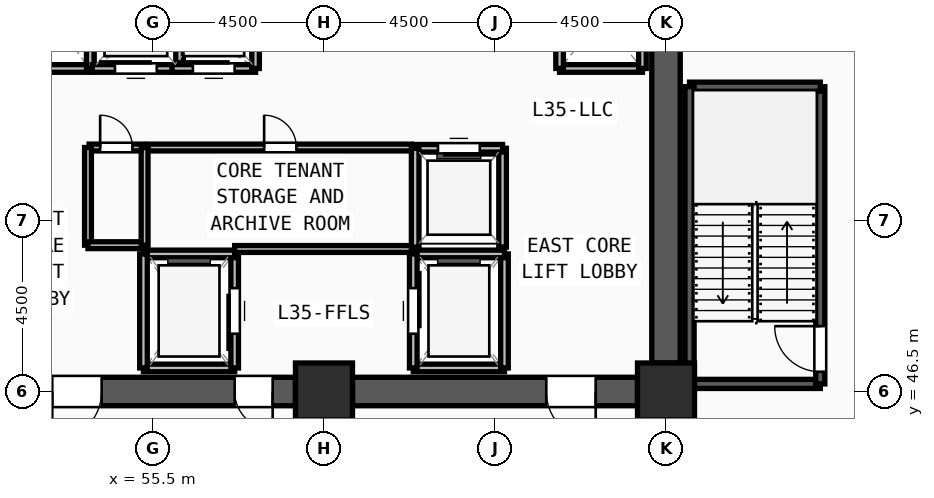
"""IFC4 building model, lengths in metres.
Left out: names, types, materials, properties, quantities, classifications, styles, units other than length and angle.
Written with IfcOpenShell. Run it as: python <this file> out.ifc"""

import sys

from ifc_helpers import new_model, si_unit, direction, frame, frame_2d, origin, origin_2d, place, context, subcontext, project, spatial, rectangle, extrude, source, transform, mapped, element, fill, save


model = new_model("IFC4")
c1 = context("Model", 3, precision=1e-05, world=origin(), true_north=direction((0.0, 1.0)))
c2 = subcontext(c1, "Body", "Model", "MODEL_VIEW")
j1 = project(units=[si_unit("LENGTHUNIT", "METRE"), si_unit("PLANEANGLEUNIT", "RADIAN")], contexts=[c1])
p1 = place(None, origin())
s1 = spatial("IfcSite", under=j1, at=p1, CompositionType="ELEMENT")
p2 = place(p1, origin())
s2 = spatial("IfcBuilding", under=s1, at=p2, CompositionType="ELEMENT")
p3 = place(p2, frame((0.0, 0.0, 135.75)))
s3 = spatial("IfcBuildingStorey", under=s2, at=p3, CompositionType="ELEMENT", Elevation=135.75)
m1 = source(origin(), c2, "Body", "SweptSolid", [
    extrude(rectangle(XDim=1.5, YDim=1.5, at=origin_2d()), origin(), (0.0, 0.0, 1.0), 3.75),
])
for number, where, z_axis, x_axis in (
    (1, (60.0, 46.5, 0.0), (0.0, 0.0, 1.0), (1.0, 0.0, 0.0)),
    (2, (69.0, 46.5, 0.0), (0.0, 0.0, 1.0), (1.0, 0.0, 0.0)),
):
    element("IfcColumn", number, at=place(p3, frame(where, z_axis=z_axis, x_axis=x_axis)), inside=s3, PredefinedType="COLUMN", context=c2, shape_type="MappedRepresentation", body=[
        mapped(m1, transform((0.0, 0.0, 0.0), x_axis=(1.0, 0.0, 0.0), y_axis=(0.0, 1.0, 0.0), z_axis=(0.0, 0.0, 1.0), scale=1.0)),
    ])
p4 = place(p3, frame((69.0, 60.75, 0.0), z_axis=(0.0, 0.0, 1.0), x_axis=(0.0, -1.0, 0.0)))
e3 = element("IfcWall", 3, at=p4, inside=s3, PredefinedType="SHEAR", context=c2, shape_type="SweptSolid", body=[
    extrude(rectangle(XDim=13.5, YDim=0.75, at=frame_2d((6.75, 0.0))), origin(), (0.0, 0.0, 1.0), 3.47),
])
m2 = source(origin(), c2, "Body", "SweptSolid", [
    extrude(rectangle(XDim=1.2, YDim=2.2, at=frame_2d((0.6, 1.1))), frame((0.0, 0.385, 0.0), z_axis=(0.0, -1.0, 0.0), x_axis=(1.0, 0.0, 0.0)), (0.0, 0.0, 1.0), 0.77),
])
p5 = place(p4, frame((1.2, 0.0, 0.0)))
e4 = element("IfcOpeningElement", 4, at=p5, cuts=e3, PredefinedType="OPENING", context=c2, shape_type="MappedRepresentation", body=[
    mapped(m2, transform((0.0, 0.0, 0.0), x_axis=(1.0, 0.0, 0.0), y_axis=(0.0, 1.0, 0.0), z_axis=(0.0, 0.0, 1.0), scale=1.0)),
])
p6 = place(p3, frame((68.25, 46.5, 0.0), z_axis=(0.0, 0.0, 1.0), x_axis=(-1.0, 0.0, 0.0)))
e5 = element("IfcWall", 5, at=p6, inside=s3, PredefinedType="SHEAR", context=c2, shape_type="SweptSolid", body=[
    extrude(rectangle(XDim=7.5, YDim=0.75, at=frame_2d((3.75, 0.0))), origin(), (0.0, 0.0, 1.0), 3.47),
])
m3 = source(origin(), c2, "Body", "SweptSolid", [
    extrude(rectangle(XDim=1.3, YDim=2.2, at=frame_2d((0.65, 1.1))), frame((0.0, 0.385, 0.0), z_axis=(0.0, -1.0, 0.0), x_axis=(1.0, 0.0, 0.0)), (0.0, 0.0, 1.0), 0.77),
])
p7 = place(p6, frame((1.1, 0.0, 0.0)))
e6 = element("IfcOpeningElement", 6, at=p7, cuts=e5, PredefinedType="OPENING", context=c2, shape_type="MappedRepresentation", body=[
    mapped(m3, transform((0.0, 0.0, 0.0), x_axis=(1.0, 0.0, 0.0), y_axis=(0.0, 1.0, 0.0), z_axis=(0.0, 0.0, 1.0), scale=1.0)),
])
p8 = place(p3, frame((59.25, 46.5, 0.0), z_axis=(0.0, 0.0, 1.0), x_axis=(-1.0, 0.0, 0.0)))
e7 = element("IfcWall", 7, at=p8, inside=s3, PredefinedType="SHEAR", context=c2, shape_type="SweptSolid", body=[
    extrude(rectangle(XDim=7.5, YDim=0.75, at=frame_2d((3.75, 0.0))), origin(), (0.0, 0.0, 1.0), 3.47),
])
p9 = place(p8, frame((5.1, 0.0, 0.0)))
e8 = element("IfcOpeningElement", 8, at=p9, cuts=e7, PredefinedType="OPENING", context=c2, shape_type="MappedRepresentation", body=[
    mapped(m3, transform((0.0, 0.0, 0.0), x_axis=(1.0, 0.0, 0.0), y_axis=(0.0, 1.0, 0.0), z_axis=(0.0, 0.0, 1.0), scale=1.0)),
])
m4 = source(origin(), c2, "Body", "SweptSolid", [
    extrude(rectangle(XDim=1.0, YDim=2.2, at=frame_2d((0.5, 1.1))), frame((0.0, 0.385, 0.0), z_axis=(0.0, -1.0, 0.0), x_axis=(1.0, 0.0, 0.0)), (0.0, 0.0, 1.0), 0.77),
])
p10 = place(p8, frame((0.6, 0.0, 0.0)))
e9 = element("IfcOpeningElement", 9, at=p10, cuts=e7, PredefinedType="OPENING", context=c2, shape_type="MappedRepresentation", body=[
    mapped(m4, transform((0.0, 0.0, 0.0), x_axis=(1.0, 0.0, 0.0), y_axis=(0.0, 1.0, 0.0), z_axis=(0.0, 0.0, 1.0), scale=1.0)),
])
p11 = place(p3, frame((69.62, 46.7, 0.0), z_axis=(0.0, 0.0, 1.0), x_axis=(1.0, 0.0, 0.0)))
e10 = element("IfcWall", 10, at=p11, inside=s3, PredefinedType="SOLIDWALL", context=c2, shape_type="SweptSolid", body=[
    extrude(rectangle(XDim=3.44, YDim=0.24, at=frame_2d((1.72, 0.0))), origin(), (0.0, 0.0, 1.0), 3.47),
])
p12 = place(p3, frame((73.06, 46.7, 0.0), z_axis=(0.0, 0.0, 1.0), x_axis=(0.0, 1.0, 0.0)))
e11 = element("IfcWall", 11, at=p12, inside=s3, PredefinedType="SOLIDWALL", context=c2, shape_type="SweptSolid", body=[
    extrude(rectangle(XDim=7.82, YDim=0.24, at=frame_2d((3.91, 0.0))), origin(), (0.0, 0.0, 1.0), 3.47),
])
m5 = source(origin(), c2, "Body", "SweptSolid", [
    extrude(rectangle(XDim=1.2, YDim=2.2, at=frame_2d((0.6, 1.1))), frame((0.0, 0.13, 0.0), z_axis=(0.0, -1.0, 0.0), x_axis=(1.0, 0.0, 0.0)), (0.0, 0.0, 1.0), 0.26),
])
p13 = place(p12, frame((0.32, 0.0, 0.0)))
e12 = element("IfcOpeningElement", 12, at=p13, cuts=e11, PredefinedType="OPENING", context=c2, shape_type="MappedRepresentation", body=[
    mapped(m5, transform((0.0, 0.0, 0.0), x_axis=(1.0, 0.0, 0.0), y_axis=(0.0, 1.0, 0.0), z_axis=(0.0, 0.0, 1.0), scale=1.0)),
])
p14 = place(p3, frame((73.06, 54.52, 0.0), z_axis=(0.0, 0.0, 1.0), x_axis=(-1.0, 0.0, 0.0)))
e13 = element("IfcWall", 13, at=p14, inside=s3, PredefinedType="SOLIDWALL", context=c2, shape_type="SweptSolid", body=[
    extrude(rectangle(XDim=3.44, YDim=0.24, at=frame_2d((1.72, 0.0))), origin(), (0.0, 0.0, 1.0), 3.47),
])
p15 = place(p3, frame((69.62, 54.52, 0.0), z_axis=(0.0, 0.0, 1.0), x_axis=(0.0, -1.0, 0.0)))
e14 = element("IfcWall", 14, at=p15, inside=s3, PredefinedType="SOLIDWALL", context=c2, shape_type="SweptSolid", body=[
    extrude(rectangle(XDim=7.82, YDim=0.24, at=frame_2d((3.91, 0.0))), origin(), (0.0, 0.0, 1.0), 3.47),
])
p16 = place(p3, frame((55.25, 47.12, 0.0), z_axis=(0.0, 0.0, 1.0), x_axis=(1.0, 0.0, 0.0)))
e15 = element("IfcWall", 15, at=p16, inside=s3, PredefinedType="SOLIDWALL", context=c2, shape_type="SweptSolid", body=[
    extrude(rectangle(XDim=2.4, YDim=0.2, at=frame_2d((1.2, 0.0))), origin(), (0.0, 0.0, 1.0), 3.47),
])
p17 = place(p3, frame((57.65, 47.12, 0.0), z_axis=(0.0, 0.0, 1.0), x_axis=(0.0, 1.0, 0.0)))
e16 = element("IfcWall", 16, at=p17, inside=s3, PredefinedType="SOLIDWALL", context=c2, shape_type="SweptSolid", body=[
    extrude(rectangle(XDim=3.0, YDim=0.2, at=frame_2d((1.5, 0.0))), origin(), (0.0, 0.0, 1.0), 3.47),
])
m6 = source(origin(), c2, "Body", "SweptSolid", [
    extrude(rectangle(XDim=1.2, YDim=2.3, at=frame_2d((0.6, 1.15))), frame((0.0, 0.11, 0.0), z_axis=(0.0, -1.0, 0.0), x_axis=(1.0, 0.0, 0.0)), (0.0, 0.0, 1.0), 0.22),
])
p18 = place(p17, frame((0.9, 0.0, 0.0)))
e17 = element("IfcOpeningElement", 17, at=p18, cuts=e16, PredefinedType="OPENING", context=c2, shape_type="MappedRepresentation", body=[
    mapped(m6, transform((0.0, 0.0, 0.0), x_axis=(1.0, 0.0, 0.0), y_axis=(0.0, 1.0, 0.0), z_axis=(0.0, 0.0, 1.0), scale=1.0)),
])
p19 = place(p3, frame((57.65, 50.12, 0.0), z_axis=(0.0, 0.0, 1.0), x_axis=(-1.0, 0.0, 0.0)))
e18 = element("IfcWall", 18, at=p19, inside=s3, PredefinedType="SOLIDWALL", context=c2, shape_type="SweptSolid", body=[
    extrude(rectangle(XDim=2.4, YDim=0.2, at=frame_2d((1.2, 0.0))), origin(), (0.0, 0.0, 1.0), 3.47),
])
p20 = place(p3, frame((55.25, 50.12, 0.0), z_axis=(0.0, 0.0, 1.0), x_axis=(0.0, -1.0, 0.0)))
e19 = element("IfcWall", 19, at=p20, inside=s3, PredefinedType="SOLIDWALL", context=c2, shape_type="SweptSolid", body=[
    extrude(rectangle(XDim=3.0, YDim=0.2, at=frame_2d((1.5, 0.0))), origin(), (0.0, 0.0, 1.0), 3.47),
])
p21 = place(p3, frame((62.35, 47.12, 0.0), z_axis=(0.0, 0.0, 1.0), x_axis=(1.0, 0.0, 0.0)))
e20 = element("IfcWall", 20, at=p21, inside=s3, PredefinedType="SOLIDWALL", context=c2, shape_type="SweptSolid", body=[
    extrude(rectangle(XDim=2.4, YDim=0.2, at=frame_2d((1.2, 0.0))), origin(), (0.0, 0.0, 1.0), 3.47),
])
p22 = place(p3, frame((64.75, 47.12, 0.0), z_axis=(0.0, 0.0, 1.0), x_axis=(0.0, 1.0, 0.0)))
e21 = element("IfcWall", 21, at=p22, inside=s3, PredefinedType="SOLIDWALL", context=c2, shape_type="SweptSolid", body=[
    extrude(rectangle(XDim=3.0, YDim=0.2, at=frame_2d((1.5, 0.0))), origin(), (0.0, 0.0, 1.0), 3.47),
])
p23 = place(p3, frame((64.75, 50.12, 0.0), z_axis=(0.0, 0.0, 1.0), x_axis=(-1.0, 0.0, 0.0)))
e22 = element("IfcWall", 22, at=p23, inside=s3, PredefinedType="SOLIDWALL", context=c2, shape_type="SweptSolid", body=[
    extrude(rectangle(XDim=2.4, YDim=0.2, at=frame_2d((1.2, 0.0))), origin(), (0.0, 0.0, 1.0), 3.47),
])
p24 = place(p3, frame((62.35, 50.12, 0.0), z_axis=(0.0, 0.0, 1.0), x_axis=(0.0, -1.0, 0.0)))
e23 = element("IfcWall", 23, at=p24, inside=s3, PredefinedType="SOLIDWALL", context=c2, shape_type="SweptSolid", body=[
    extrude(rectangle(XDim=3.0, YDim=0.2, at=frame_2d((1.5, 0.0))), origin(), (0.0, 0.0, 1.0), 3.47),
])
p25 = place(p24, frame((0.9, 0.0, 0.0)))
e24 = element("IfcOpeningElement", 24, at=p25, cuts=e23, PredefinedType="OPENING", context=c2, shape_type="MappedRepresentation", body=[
    mapped(m6, transform((0.0, 0.0, 0.0), x_axis=(1.0, 0.0, 0.0), y_axis=(0.0, 1.0, 0.0), z_axis=(0.0, 0.0, 1.0), scale=1.0)),
])
p26 = place(p3, frame((51.62, 55.0, 0.0), z_axis=(0.0, 0.0, 1.0), x_axis=(1.0, 0.0, 0.0)))
e25 = element("IfcWall", 25, at=p26, inside=s3, PredefinedType="SOLIDWALL", context=c2, shape_type="SweptSolid", body=[
    extrude(rectangle(XDim=2.23, YDim=0.2, at=frame_2d((1.115, 0.0))), origin(), (0.0, 0.0, 1.0), 3.47),
])
p27 = place(p3, frame((53.85, 55.0, 0.0), z_axis=(0.0, 0.0, 1.0), x_axis=(0.0, 1.0, 0.0)))
e26 = element("IfcWall", 26, at=p27, inside=s3, PredefinedType="SOLIDWALL", context=c2, shape_type="SweptSolid", body=[
    extrude(rectangle(XDim=3.0, YDim=0.2, at=frame_2d((1.5, 0.0))), origin(), (0.0, 0.0, 1.0), 3.47),
])
p28 = place(p3, frame((66.2, 55.0, 0.0), z_axis=(0.0, 0.0, 1.0), x_axis=(1.0, 0.0, 0.0)))
e27 = element("IfcWall", 27, at=p28, inside=s3, PredefinedType="SOLIDWALL", context=c2, shape_type="SweptSolid", body=[
    extrude(rectangle(XDim=2.18, YDim=0.2, at=frame_2d((1.09, 0.0))), origin(), (0.0, 0.0, 1.0), 3.47),
])
for number, where, z_axis, x_axis in (
    (28, (68.38, 55.0, 0.0), (0.0, 0.0, 1.0), (0.0, 1.0, 0.0)),
    (29, (66.2, 57.75, 0.0), (0.0, 0.0, 1.0), (0.0, -1.0, 0.0)),
):
    element("IfcWall", number, at=place(p3, frame(where, z_axis=z_axis, x_axis=x_axis)), inside=s3, PredefinedType="SOLIDWALL", context=c2, shape_type="SweptSolid", body=[
        extrude(rectangle(XDim=2.75, YDim=0.2, at=frame_2d((1.375, 0.0))), origin(), (0.0, 0.0, 1.0), 3.47),
    ])
p29 = place(p3, frame((64.7, 50.3, 0.0), z_axis=(0.0, 0.0, 1.0), x_axis=(0.0, 1.0, 0.0)))
e30 = element("IfcWall", 30, at=p29, inside=s3, PredefinedType="SOLIDWALL", context=c2, shape_type="SweptSolid", body=[
    extrude(rectangle(XDim=2.6, YDim=0.2, at=frame_2d((1.3, 0.0))), origin(), (0.0, 0.0, 1.0), 3.47),
])
p30 = place(p3, frame((64.7, 52.9, 0.0), z_axis=(0.0, 0.0, 1.0), x_axis=(-1.0, 0.0, 0.0)))
e31 = element("IfcWall", 31, at=p30, inside=s3, PredefinedType="SOLIDWALL", context=c2, shape_type="SweptSolid", body=[
    extrude(rectangle(XDim=2.3, YDim=0.2, at=frame_2d((1.15, 0.0))), origin(), (0.0, 0.0, 1.0), 3.47),
])
m7 = source(origin(), c2, "Body", "SweptSolid", [
    extrude(rectangle(XDim=1.1, YDim=2.2, at=frame_2d((0.55, 1.1))), frame((0.0, 0.11, 0.0), z_axis=(0.0, -1.0, 0.0), x_axis=(1.0, 0.0, 0.0)), (0.0, 0.0, 1.0), 0.22),
])
p31 = place(p30, frame((0.6, 0.0, 0.0)))
e32 = element("IfcOpeningElement", 32, at=p31, cuts=e31, PredefinedType="OPENING", context=c2, shape_type="MappedRepresentation", body=[
    mapped(m7, transform((0.0, 0.0, 0.0), x_axis=(1.0, 0.0, 0.0), y_axis=(0.0, 1.0, 0.0), z_axis=(0.0, 0.0, 1.0), scale=1.0)),
])
p32 = place(p3, frame((62.4, 52.9, 0.0), z_axis=(0.0, 0.0, 1.0), x_axis=(0.0, -1.0, 0.0)))
e33 = element("IfcWall", 33, at=p32, inside=s3, PredefinedType="SOLIDWALL", context=c2, shape_type="SweptSolid", body=[
    extrude(rectangle(XDim=2.6, YDim=0.2, at=frame_2d((1.3, 0.0))), origin(), (0.0, 0.0, 1.0), 3.47),
])
p33 = place(p3, frame((53.9, 55.0, 0.0), z_axis=(0.0, 0.0, 1.0), x_axis=(1.0, 0.0, 0.0)))
e34 = element("IfcWall", 34, at=p33, inside=s3, PredefinedType="SOLIDWALL", context=c2, shape_type="SweptSolid", body=[
    extrude(rectangle(XDim=2.3, YDim=0.2, at=frame_2d((1.15, 0.0))), origin(), (0.0, 0.0, 1.0), 3.47),
])
p34 = place(p33, frame((0.6, 0.0, 0.0)))
e35 = element("IfcOpeningElement", 35, at=p34, cuts=e34, PredefinedType="OPENING", context=c2, shape_type="MappedRepresentation", body=[
    mapped(m7, transform((0.0, 0.0, 0.0), x_axis=(1.0, 0.0, 0.0), y_axis=(0.0, 1.0, 0.0), z_axis=(0.0, 0.0, 1.0), scale=1.0)),
])
p35 = place(p3, frame((56.2, 55.0, 0.0), z_axis=(0.0, 0.0, 1.0), x_axis=(0.0, 1.0, 0.0)))
e36 = element("IfcWall", 36, at=p35, inside=s3, PredefinedType="SOLIDWALL", context=c2, shape_type="SweptSolid", body=[
    extrude(rectangle(XDim=2.6, YDim=0.2, at=frame_2d((1.3, 0.0))), origin(), (0.0, 0.0, 1.0), 3.47),
])
p36 = place(p3, frame((56.0, 55.0, 0.0), z_axis=(0.0, 0.0, 1.0), x_axis=(1.0, 0.0, 0.0)))
e37 = element("IfcWall", 37, at=p36, inside=s3, PredefinedType="SOLIDWALL", context=c2, shape_type="SweptSolid", body=[
    extrude(rectangle(XDim=2.2, YDim=0.2, at=frame_2d((1.1, 0.0))), origin(), (0.0, 0.0, 1.0), 3.47),
])
p37 = place(p36, frame((0.55, 0.0, 0.0)))
e38 = element("IfcOpeningElement", 38, at=p37, cuts=e37, PredefinedType="OPENING", context=c2, shape_type="MappedRepresentation", body=[
    mapped(m7, transform((0.0, 0.0, 0.0), x_axis=(1.0, 0.0, 0.0), y_axis=(0.0, 1.0, 0.0), z_axis=(0.0, 0.0, 1.0), scale=1.0)),
])
p38 = place(p3, frame((58.2, 55.0, 0.0), z_axis=(0.0, 0.0, 1.0), x_axis=(0.0, 1.0, 0.0)))
e39 = element("IfcWall", 39, at=p38, inside=s3, PredefinedType="SOLIDWALL", context=c2, shape_type="SweptSolid", body=[
    extrude(rectangle(XDim=2.6, YDim=0.2, at=frame_2d((1.3, 0.0))), origin(), (0.0, 0.0, 1.0), 3.47),
])
p39 = place(p3, frame((55.37, 52.92, 0.0), z_axis=(0.0, 0.0, 1.0), x_axis=(1.0, 0.0, 0.0)))
e40 = element("IfcWall", 40, at=p39, inside=s3, PredefinedType="PARTITIONING", context=c2, shape_type="SweptSolid", body=[
    extrude(rectangle(XDim=6.93, YDim=0.18, at=frame_2d((3.465, 0.0))), origin(), (0.0, 0.0, 1.0), 3.47),
])
m8 = source(origin(), c2, "Body", "SweptSolid", [
    extrude(rectangle(XDim=0.85, YDim=2.1, at=frame_2d((0.425, 1.05))), frame((0.0, 0.1, 0.0), z_axis=(0.0, -1.0, 0.0), x_axis=(1.0, 0.0, 0.0)), (0.0, 0.0, 1.0), 0.2),
])
p40 = place(p39, frame((3.055, 0.0, 0.0)))
e41 = element("IfcOpeningElement", 41, at=p40, cuts=e40, PredefinedType="OPENING", context=c2, shape_type="MappedRepresentation", body=[
    mapped(m8, transform((0.0, 0.0, 0.0), x_axis=(1.0, 0.0, 0.0), y_axis=(0.0, 1.0, 0.0), z_axis=(0.0, 0.0, 1.0), scale=1.0)),
])
p41 = place(p3, frame((53.82, 52.92, 0.0), z_axis=(0.0, 0.0, 1.0), x_axis=(1.0, 0.0, 0.0)))
e42 = element("IfcWall", 42, at=p41, inside=s3, PredefinedType="PARTITIONING", context=c2, shape_type="SweptSolid", body=[
    extrude(rectangle(XDim=1.43, YDim=0.18, at=frame_2d((0.715, 0.0))), origin(), (0.0, 0.0, 1.0), 3.47),
])
p42 = place(p41, frame((0.29, 0.0, 0.0)))
e43 = element("IfcOpeningElement", 43, at=p42, cuts=e42, PredefinedType="OPENING", context=c2, shape_type="MappedRepresentation", body=[
    mapped(m8, transform((0.0, 0.0, 0.0), x_axis=(1.0, 0.0, 0.0), y_axis=(0.0, 1.0, 0.0), z_axis=(0.0, 0.0, 1.0), scale=1.0)),
])
p43 = place(p3, frame((53.79, 50.35, 0.0), z_axis=(0.0, 0.0, 1.0), x_axis=(0.0, 1.0, 0.0)))
e44 = element("IfcWall", 44, at=p43, inside=s3, PredefinedType="PARTITIONING", context=c2, shape_type="SweptSolid", body=[
    extrude(rectangle(XDim=2.57, YDim=0.18, at=frame_2d((1.285, 0.0))), origin(), (0.0, 0.0, 1.0), 3.47),
])
p44 = place(p3, frame((53.79, 50.35, 0.0), z_axis=(0.0, 0.0, 1.0), x_axis=(1.0, 0.0, 0.0)))
e45 = element("IfcWall", 45, at=p44, inside=s3, PredefinedType="PARTITIONING", context=c2, shape_type="SweptSolid", body=[
    extrude(rectangle(XDim=1.49, YDim=0.18, at=frame_2d((0.745, 0.0))), origin(), (0.0, 0.0, 1.0), 3.47),
])
p45 = place(p3, frame((55.28, 50.35, 0.0), z_axis=(0.0, 0.0, 1.0), x_axis=(0.0, 1.0, 0.0)))
e46 = element("IfcWall", 46, at=p45, inside=s3, PredefinedType="PARTITIONING", context=c2, shape_type="SweptSolid", body=[
    extrude(rectangle(XDim=2.57, YDim=0.18, at=frame_2d((1.285, 0.0))), origin(), (0.0, 0.0, 1.0), 3.47),
])
p46 = place(p3, frame((57.65, 50.25, 0.0), z_axis=(0.0, 0.0, 1.0), x_axis=(1.0, 0.0, 0.0)))
e47 = element("IfcWall", 47, at=p46, inside=s3, PredefinedType="PARTITIONING", context=c2, shape_type="SweptSolid", body=[
    extrude(rectangle(XDim=4.65, YDim=0.18, at=frame_2d((2.325, 0.0))), origin(), (0.0, 0.0, 1.0), 3.47),
])
m9 = source(origin(), c2, "Body", "SweptSolid", [
    extrude(rectangle(XDim=1.3, YDim=2.2, at=frame_2d((0.65, 1.1))), frame((0.0, 0.025, 0.0), z_axis=(0.0, -1.0, 0.0), x_axis=(1.0, 0.0, 0.0)), (0.0, 0.0, 1.0), 0.05),
])
p47 = place(p9, origin())
e48 = element("IfcDoor", 48, at=p47, inside=s3, OperationType="SINGLE_SWING_RIGHT", PredefinedType="DOOR", context=c2, shape_type="MappedRepresentation", body=[
    mapped(m9, transform((0.0, 0.0, 0.0), x_axis=(1.0, 0.0, 0.0), y_axis=(0.0, 1.0, 0.0), z_axis=(0.0, 0.0, 1.0), scale=1.0)),
])
fill(e8, e48)
m10 = source(origin(), c2, "Body", "SweptSolid", [
    extrude(rectangle(XDim=1.0, YDim=2.2, at=frame_2d((0.5, 1.1))), frame((0.0, 0.025, 0.0), z_axis=(0.0, -1.0, 0.0), x_axis=(1.0, 0.0, 0.0)), (0.0, 0.0, 1.0), 0.05),
])
p48 = place(p10, origin())
e49 = element("IfcDoor", 49, at=p48, inside=s3, OperationType="SINGLE_SWING_LEFT", PredefinedType="DOOR", context=c2, shape_type="MappedRepresentation", body=[
    mapped(m10, transform((0.0, 0.0, 0.0), x_axis=(1.0, 0.0, 0.0), y_axis=(0.0, 1.0, 0.0), z_axis=(0.0, 0.0, 1.0), scale=1.0)),
])
fill(e9, e49)
p49 = place(p7, origin())
e50 = element("IfcDoor", 50, at=p49, inside=s3, OperationType="SINGLE_SWING_LEFT", PredefinedType="DOOR", context=c2, shape_type="MappedRepresentation", body=[
    mapped(m9, transform((0.0, 0.0, 0.0), x_axis=(1.0, 0.0, 0.0), y_axis=(0.0, 1.0, 0.0), z_axis=(0.0, 0.0, 1.0), scale=1.0)),
])
fill(e6, e50)
m11 = source(origin(), c2, "Body", "SweptSolid", [
    extrude(rectangle(XDim=1.2, YDim=2.2, at=frame_2d((0.6, 1.1))), frame((0.0, 0.025, 0.0), z_axis=(0.0, -1.0, 0.0), x_axis=(1.0, 0.0, 0.0)), (0.0, 0.0, 1.0), 0.05),
])
p50 = place(p13, origin())
e51 = element("IfcDoor", 51, at=p50, inside=s3, OperationType="SINGLE_SWING_RIGHT", PredefinedType="DOOR", context=c2, shape_type="MappedRepresentation", body=[
    mapped(m11, transform((0.0, 0.0, 0.0), x_axis=(1.0, 0.0, 0.0), y_axis=(0.0, 1.0, 0.0), z_axis=(0.0, 0.0, 1.0), scale=1.0)),
])
fill(e12, e51)
m12 = source(origin(), c2, "Body", "SweptSolid", [
    extrude(rectangle(XDim=1.2, YDim=2.3, at=frame_2d((0.6, 1.15))), frame((0.0, 0.025, 0.0), z_axis=(0.0, -1.0, 0.0), x_axis=(1.0, 0.0, 0.0)), (0.0, 0.0, 1.0), 0.05),
])
p51 = place(p18, origin())
e52 = element("IfcDoor", 52, at=p51, inside=s3, OperationType="SLIDING_TO_LEFT", PredefinedType="DOOR", context=c2, shape_type="MappedRepresentation", body=[
    mapped(m12, transform((0.0, 0.0, 0.0), x_axis=(1.0, 0.0, 0.0), y_axis=(0.0, 1.0, 0.0), z_axis=(0.0, 0.0, 1.0), scale=1.0)),
])
fill(e17, e52)
p52 = place(p25, origin())
e53 = element("IfcDoor", 53, at=p52, inside=s3, OperationType="SLIDING_TO_LEFT", PredefinedType="DOOR", context=c2, shape_type="MappedRepresentation", body=[
    mapped(m12, transform((0.0, 0.0, 0.0), x_axis=(1.0, 0.0, 0.0), y_axis=(0.0, 1.0, 0.0), z_axis=(0.0, 0.0, 1.0), scale=1.0)),
])
fill(e24, e53)
m13 = source(origin(), c2, "Body", "SweptSolid", [
    extrude(rectangle(XDim=1.1, YDim=2.2, at=frame_2d((0.55, 1.1))), frame((0.0, 0.025, 0.0), z_axis=(0.0, -1.0, 0.0), x_axis=(1.0, 0.0, 0.0)), (0.0, 0.0, 1.0), 0.05),
])
p53 = place(p31, origin())
e54 = element("IfcDoor", 54, at=p53, inside=s3, OperationType="SLIDING_TO_LEFT", PredefinedType="DOOR", context=c2, shape_type="MappedRepresentation", body=[
    mapped(m13, transform((0.0, 0.0, 0.0), x_axis=(1.0, 0.0, 0.0), y_axis=(0.0, 1.0, 0.0), z_axis=(0.0, 0.0, 1.0), scale=1.0)),
])
fill(e32, e54)
p54 = place(p34, origin())
e55 = element("IfcDoor", 55, at=p54, inside=s3, OperationType="SLIDING_TO_LEFT", PredefinedType="DOOR", context=c2, shape_type="MappedRepresentation", body=[
    mapped(m13, transform((0.0, 0.0, 0.0), x_axis=(1.0, 0.0, 0.0), y_axis=(0.0, 1.0, 0.0), z_axis=(0.0, 0.0, 1.0), scale=1.0)),
])
fill(e35, e55)
p55 = place(p37, origin())
e56 = element("IfcDoor", 56, at=p55, inside=s3, OperationType="SLIDING_TO_LEFT", PredefinedType="DOOR", context=c2, shape_type="MappedRepresentation", body=[
    mapped(m13, transform((0.0, 0.0, 0.0), x_axis=(1.0, 0.0, 0.0), y_axis=(0.0, 1.0, 0.0), z_axis=(0.0, 0.0, 1.0), scale=1.0)),
])
fill(e38, e56)
m14 = source(origin(), c2, "Body", "SweptSolid", [
    extrude(rectangle(XDim=0.85, YDim=2.1, at=frame_2d((0.425, 1.05))), frame((0.0, 0.025, 0.0), z_axis=(0.0, -1.0, 0.0), x_axis=(1.0, 0.0, 0.0)), (0.0, 0.0, 1.0), 0.05),
])
p56 = place(p40, origin())
e57 = element("IfcDoor", 57, at=p56, inside=s3, OperationType="SINGLE_SWING_LEFT", PredefinedType="DOOR", context=c2, shape_type="MappedRepresentation", body=[
    mapped(m14, transform((0.0, 0.0, 0.0), x_axis=(1.0, 0.0, 0.0), y_axis=(0.0, 1.0, 0.0), z_axis=(0.0, 0.0, 1.0), scale=1.0)),
])
fill(e41, e57)
p57 = place(p42, origin())
e58 = element("IfcDoor", 58, at=p57, inside=s3, OperationType="SINGLE_SWING_LEFT", PredefinedType="DOOR", context=c2, shape_type="MappedRepresentation", body=[
    mapped(m14, transform((0.0, 0.0, 0.0), x_axis=(1.0, 0.0, 0.0), y_axis=(0.0, 1.0, 0.0), z_axis=(0.0, 0.0, 1.0), scale=1.0)),
])
fill(e43, e58)
save(model, sys.argv[1])
